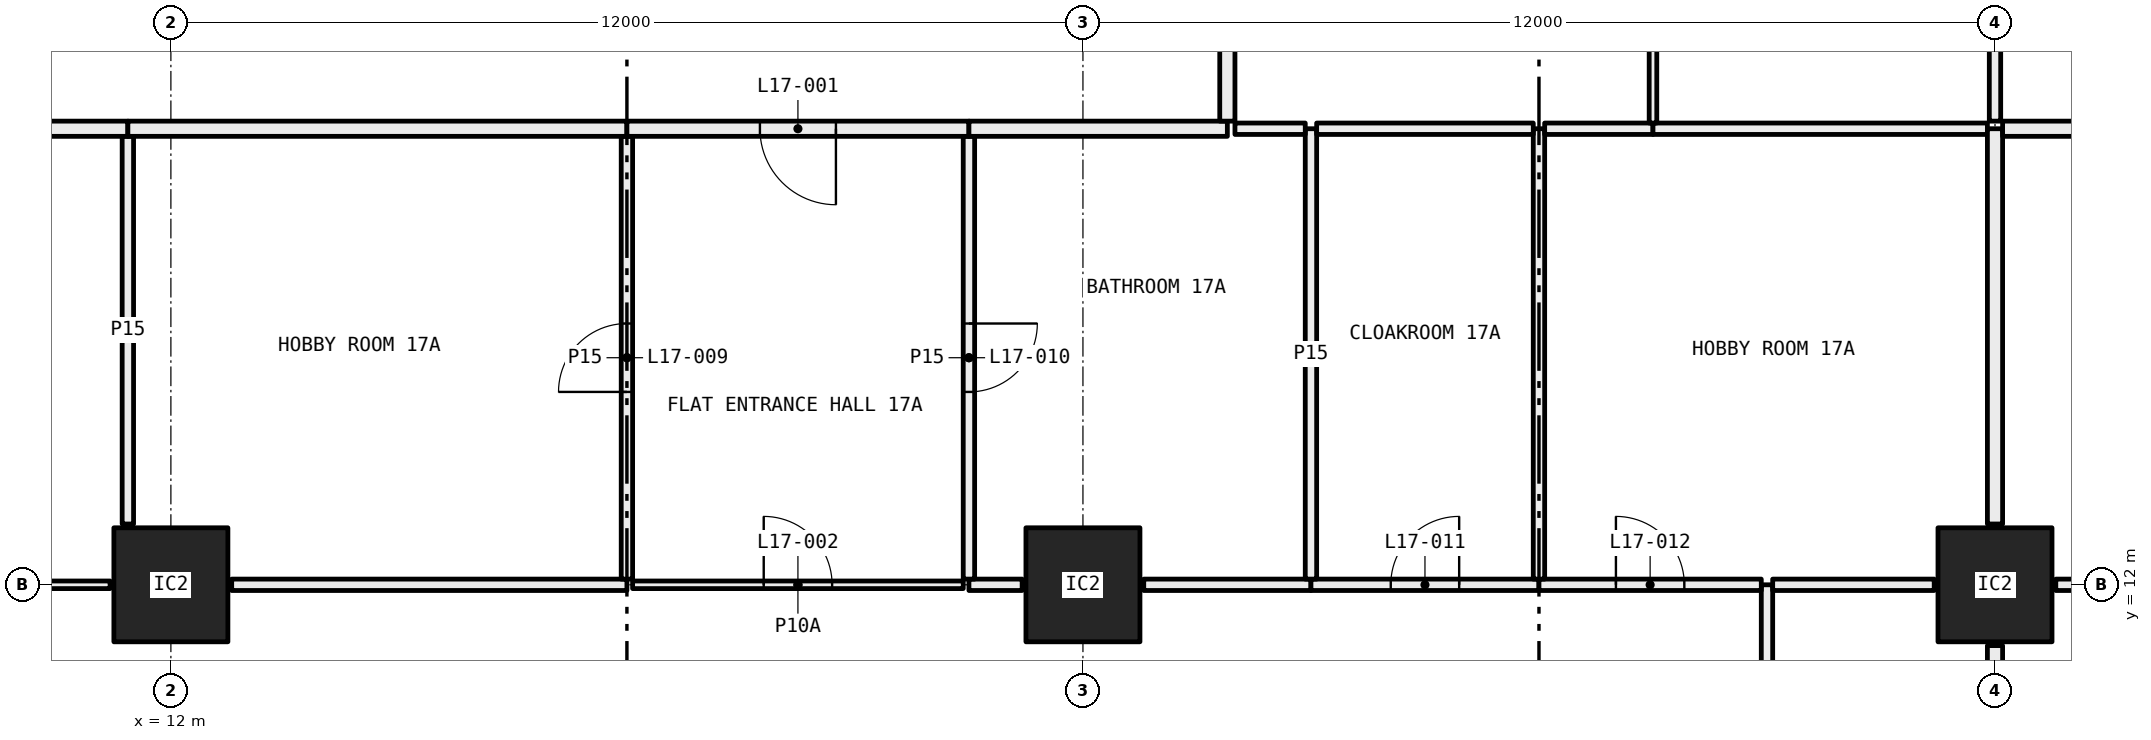
"""IFC4 building model, lengths in metres.
Left out: names, types, materials, properties, quantities, classifications, styles, units other than length and angle.
Written with IfcOpenShell. Run it as: python <this file> out.ifc"""

import sys

from ifc_helpers import new_model, si_unit, direction, frame, frame_2d, origin, origin_2d, place, context, subcontext, project, spatial, rectangle, hollow_rectangle, extrude, element, fill, save


model = new_model("IFC4")
c1 = context("Model", 3, precision=1e-05, world=origin(), true_north=direction((0.0, 1.0)))
c2 = subcontext(c1, "Body", "Model", "MODEL_VIEW")
j1 = project(units=[si_unit("LENGTHUNIT", "METRE"), si_unit("PLANEANGLEUNIT", "RADIAN")], contexts=[c1])
p1 = place(None, origin())
s1 = spatial("IfcSite", under=j1, at=p1, CompositionType="ELEMENT")
p2 = place(p1, origin())
s2 = spatial("IfcBuilding", under=s1, at=p2, CompositionType="ELEMENT")
p3 = place(p2, frame((0.0, 0.0, 71.4)))
s3 = spatial("IfcBuildingStorey", under=s2, at=p3, CompositionType="ELEMENT", Elevation=71.4)
for number, where, z_axis, x_axis in (
    (1, (12.0, 12.0, 0.0), (0.0, 0.0, 1.0), (1.0, 0.0, 0.0)),
    (2, (24.0, 12.0, 0.0), (0.0, 0.0, 1.0), (1.0, 0.0, 0.0)),
    (3, (36.0, 12.0, 0.0), (0.0, 0.0, 1.0), (1.0, 0.0, 0.0)),
):
    element("IfcColumn", number, at=place(p3, frame(where, z_axis=z_axis, x_axis=x_axis)), inside=s3, PredefinedType="COLUMN", context=c2, shape_type="SweptSolid", body=[
        extrude(hollow_rectangle(XDim=1.5, YDim=1.5, WallThickness=0.065, at=origin_2d()), origin(), (0.0, 0.0, 1.0), 3.05),
    ])
p4 = place(p3, frame((33.0, 6.075, 0.0), z_axis=(0.0, 0.0, 1.0), x_axis=(0.0, 1.0, 0.0)))
e4 = element("IfcWall", 4, at=p4, inside=s3, PredefinedType="PARTITIONING", context=c2, shape_type="SweptSolid", body=[
    extrude(rectangle(XDim=5.925, YDim=0.15, at=frame_2d((2.962, 0.0))), origin(), (0.0, 0.0, 1.0), 2.45),
])
p5 = place(p4, frame((2.512, 0.0, 0.0)))
e5 = element("IfcOpeningElement", 5, at=p5, cuts=e4, PredefinedType="OPENING", context=c2, shape_type="SweptSolid", body=[
    extrude(rectangle(XDim=0.9, YDim=2.1, at=frame_2d((0.45, 1.05))), frame((0.0, 0.085, 0.0), z_axis=(0.0, -1.0, 0.0), x_axis=(1.0, 0.0, 0.0)), (0.0, 0.0, 1.0), 0.17),
])
p6 = place(p3, frame((11.2, 12.0, 0.0), z_axis=(0.0, 0.0, 1.0), x_axis=(-1.0, 0.0, 0.0)))
e6 = element("IfcWall", 6, at=p6, inside=s3, PredefinedType="PARTITIONING", context=c2, shape_type="SweptSolid", body=[
    extrude(rectangle(XDim=10.48, YDim=0.1, at=frame_2d((5.24, 0.0))), origin(), (0.0, 0.0, 1.0), 2.45),
])
p7 = place(p6, frame((4.79, 0.0, 0.0)))
e7 = element("IfcOpeningElement", 7, at=p7, cuts=e6, PredefinedType="OPENING", context=c2, shape_type="SweptSolid", body=[
    extrude(rectangle(XDim=0.9, YDim=2.1, at=frame_2d((0.45, 1.05))), frame((0.0, 0.06, 0.0), z_axis=(0.0, -1.0, 0.0), x_axis=(1.0, 0.0, 0.0)), (0.0, 0.0, 1.0), 0.12),
])
p8 = place(p3, frame((18.0, 12.0, 0.0), z_axis=(0.0, 0.0, 1.0), x_axis=(-1.0, 0.0, 0.0)))
e8 = element("IfcWall", 8, at=p8, inside=s3, PredefinedType="PARTITIONING", context=c2, shape_type="SweptSolid", body=[
    extrude(rectangle(XDim=5.2, YDim=0.15, at=frame_2d((2.6, 0.0))), origin(), (0.0, 0.0, 1.0), 2.45),
])
p9 = place(p3, frame((22.425, 12.0, 0.0), z_axis=(0.0, 0.0, 1.0), x_axis=(-1.0, 0.0, 0.0)))
e9 = element("IfcWall", 9, at=p9, inside=s3, PredefinedType="PARTITIONING", context=c2, shape_type="SweptSolid", body=[
    extrude(rectangle(XDim=4.35, YDim=0.1, at=frame_2d((2.175, 0.0))), origin(), (0.0, 0.0, 1.0), 2.45),
])
p10 = place(p9, frame((1.725, 0.0, 0.0)))
e10 = element("IfcOpeningElement", 10, at=p10, cuts=e9, PredefinedType="OPENING", context=c2, shape_type="SweptSolid", body=[
    extrude(rectangle(XDim=0.9, YDim=2.1, at=frame_2d((0.45, 1.05))), frame((0.0, 0.06, 0.0), z_axis=(0.0, -1.0, 0.0), x_axis=(1.0, 0.0, 0.0)), (0.0, 0.0, 1.0), 0.12),
])
p11 = place(p3, frame((23.2, 12.0, 0.0), z_axis=(0.0, 0.0, 1.0), x_axis=(-1.0, 0.0, 0.0)))
e11 = element("IfcWall", 11, at=p11, inside=s3, PredefinedType="PARTITIONING", context=c2, shape_type="SweptSolid", body=[
    extrude(rectangle(XDim=0.7, YDim=0.15, at=frame_2d((0.35, 0.0))), origin(), (0.0, 0.0, 1.0), 2.45),
])
p12 = place(p3, frame((27.0, 12.0, 0.0), z_axis=(0.0, 0.0, 1.0), x_axis=(-1.0, 0.0, 0.0)))
e12 = element("IfcWall", 12, at=p12, inside=s3, PredefinedType="PARTITIONING", context=c2, shape_type="SweptSolid", body=[
    extrude(rectangle(XDim=2.2, YDim=0.15, at=frame_2d((1.1, 0.0))), origin(), (0.0, 0.0, 1.0), 2.45),
])
p13 = place(p3, frame((30.0, 12.0, 0.0), z_axis=(0.0, 0.0, 1.0), x_axis=(-1.0, 0.0, 0.0)))
e13 = element("IfcWall", 13, at=p13, inside=s3, PredefinedType="PARTITIONING", context=c2, shape_type="SweptSolid", body=[
    extrude(rectangle(XDim=3.0, YDim=0.15, at=frame_2d((1.5, 0.0))), origin(), (0.0, 0.0, 1.0), 2.45),
])
p14 = place(p13, frame((1.05, 0.0, 0.0)))
e14 = element("IfcOpeningElement", 14, at=p14, cuts=e13, PredefinedType="OPENING", context=c2, shape_type="SweptSolid", body=[
    extrude(rectangle(XDim=0.9, YDim=2.1, at=frame_2d((0.45, 1.05))), frame((0.0, 0.085, 0.0), z_axis=(0.0, -1.0, 0.0), x_axis=(1.0, 0.0, 0.0)), (0.0, 0.0, 1.0), 0.17),
])
p15 = place(p3, frame((32.925, 12.0, 0.0), z_axis=(0.0, 0.0, 1.0), x_axis=(-1.0, 0.0, 0.0)))
e15 = element("IfcWall", 15, at=p15, inside=s3, PredefinedType="PARTITIONING", context=c2, shape_type="SweptSolid", body=[
    extrude(rectangle(XDim=2.925, YDim=0.15, at=frame_2d((1.462, 0.0))), origin(), (0.0, 0.0, 1.0), 2.45),
])
p16 = place(p15, frame((1.012, 0.0, 0.0)))
e16 = element("IfcOpeningElement", 16, at=p16, cuts=e15, PredefinedType="OPENING", context=c2, shape_type="SweptSolid", body=[
    extrude(rectangle(XDim=0.9, YDim=2.1, at=frame_2d((0.45, 1.05))), frame((0.0, 0.085, 0.0), z_axis=(0.0, -1.0, 0.0), x_axis=(1.0, 0.0, 0.0)), (0.0, 0.0, 1.0), 0.17),
])
p17 = place(p3, frame((35.2, 12.0, 0.0), z_axis=(0.0, 0.0, 1.0), x_axis=(-1.0, 0.0, 0.0)))
e17 = element("IfcWall", 17, at=p17, inside=s3, PredefinedType="PARTITIONING", context=c2, shape_type="SweptSolid", body=[
    extrude(rectangle(XDim=2.125, YDim=0.15, at=frame_2d((1.062, 0.0))), origin(), (0.0, 0.0, 1.0), 2.45),
])
p18 = place(p3, frame((36.0, 6.0, 0.0), z_axis=(0.0, 0.0, 1.0), x_axis=(0.0, 1.0, 0.0)))
e18 = element("IfcWall", 18, at=p18, inside=s3, PredefinedType="PARTITIONING", context=c2, shape_type="SweptSolid", body=[
    extrude(rectangle(XDim=5.2, YDim=0.2, at=frame_2d((2.6, 0.0))), origin(), (0.0, 0.0, 1.0), 2.45),
])
p19 = place(p3, frame((11.434, 12.8, 0.0), z_axis=(0.0, 0.0, 1.0), x_axis=(0.0, 1.0, 0.0)))
e19 = element("IfcWall", 19, at=p19, inside=s3, PredefinedType="PARTITIONING", context=c2, shape_type="SweptSolid", body=[
    extrude(rectangle(XDim=5.1, YDim=0.15, at=frame_2d((2.55, 0.0))), origin(), (0.0, 0.0, 1.0), 3.05),
])
p20 = place(p3, frame((11.434, 18.0, 0.0), z_axis=(0.0, 0.0, 1.0), x_axis=(-1.0, 0.0, 0.0)))
e20 = element("IfcWall", 20, at=p20, inside=s3, PredefinedType="PARTITIONING", context=c2, shape_type="SweptSolid", body=[
    extrude(rectangle(XDim=1.334, YDim=0.2, at=frame_2d((0.667, 0.0))), origin(), (0.0, 0.0, 1.0), 3.05),
])
p21 = place(p3, frame((18.0, 12.075, 0.0), z_axis=(0.0, 0.0, 1.0), x_axis=(0.0, 1.0, 0.0)))
e21 = element("IfcWall", 21, at=p21, inside=s3, PredefinedType="PARTITIONING", context=c2, shape_type="SweptSolid", body=[
    extrude(rectangle(XDim=5.825, YDim=0.15, at=frame_2d((2.913, 0.0))), origin(), (0.0, 0.0, 1.0), 2.45),
])
p22 = place(p21, frame((2.462, 0.0, 0.0)))
e22 = element("IfcOpeningElement", 22, at=p22, cuts=e21, PredefinedType="OPENING", context=c2, shape_type="SweptSolid", body=[
    extrude(rectangle(XDim=0.9, YDim=2.1, at=frame_2d((0.45, 1.05))), frame((0.0, 0.085, 0.0), z_axis=(0.0, -1.0, 0.0), x_axis=(1.0, 0.0, 0.0)), (0.0, 0.0, 1.0), 0.17),
])
p23 = place(p3, frame((18.0, 18.0, 0.0), z_axis=(0.0, 0.0, 1.0), x_axis=(-1.0, 0.0, 0.0)))
e23 = element("IfcWall", 23, at=p23, inside=s3, PredefinedType="PARTITIONING", context=c2, shape_type="SweptSolid", body=[
    extrude(rectangle(XDim=6.566, YDim=0.2, at=frame_2d((3.283, 0.0))), origin(), (0.0, 0.0, 1.0), 3.05),
])
p24 = place(p3, frame((22.5, 12.075, 0.0), z_axis=(0.0, 0.0, 1.0), x_axis=(0.0, 1.0, 0.0)))
e24 = element("IfcWall", 24, at=p24, inside=s3, PredefinedType="PARTITIONING", context=c2, shape_type="SweptSolid", body=[
    extrude(rectangle(XDim=5.825, YDim=0.15, at=frame_2d((2.913, 0.0))), origin(), (0.0, 0.0, 1.0), 2.45),
])
p25 = place(p24, frame((2.462, 0.0, 0.0)))
e25 = element("IfcOpeningElement", 25, at=p25, cuts=e24, PredefinedType="OPENING", context=c2, shape_type="SweptSolid", body=[
    extrude(rectangle(XDim=0.9, YDim=2.1, at=frame_2d((0.45, 1.05))), frame((0.0, 0.085, 0.0), z_axis=(0.0, -1.0, 0.0), x_axis=(1.0, 0.0, 0.0)), (0.0, 0.0, 1.0), 0.17),
])
p26 = place(p3, frame((22.5, 18.0, 0.0), z_axis=(0.0, 0.0, 1.0), x_axis=(-1.0, 0.0, 0.0)))
e26 = element("IfcWall", 26, at=p26, inside=s3, PredefinedType="PARTITIONING", context=c2, shape_type="SweptSolid", body=[
    extrude(rectangle(XDim=4.5, YDim=0.2, at=frame_2d((2.25, 0.0))), origin(), (0.0, 0.0, 1.0), 3.05),
])
p27 = place(p26, frame((1.75, 0.0, 0.0)))
e27 = element("IfcOpeningElement", 27, at=p27, cuts=e26, PredefinedType="OPENING", context=c2, shape_type="SweptSolid", body=[
    extrude(rectangle(XDim=1.0, YDim=2.1, at=frame_2d((0.5, 1.05))), frame((0.0, 0.11, 0.0), z_axis=(0.0, -1.0, 0.0), x_axis=(1.0, 0.0, 0.0)), (0.0, 0.0, 1.0), 0.22),
])
p28 = place(p3, frame((27.0, 12.075, 0.0), z_axis=(0.0, 0.0, 1.0), x_axis=(0.0, 1.0, 0.0)))
e28 = element("IfcWall", 28, at=p28, inside=s3, PredefinedType="PARTITIONING", context=c2, shape_type="SweptSolid", body=[
    extrude(rectangle(XDim=5.925, YDim=0.15, at=frame_2d((2.962, 0.0))), origin(), (0.0, 0.0, 1.0), 2.45),
])
p29 = place(p3, frame((26.925, 18.0, 0.0), z_axis=(0.0, 0.0, 1.0), x_axis=(-1.0, 0.0, 0.0)))
e29 = element("IfcWall", 29, at=p29, inside=s3, PredefinedType="PARTITIONING", context=c2, shape_type="SweptSolid", body=[
    extrude(rectangle(XDim=0.925, YDim=0.15, at=frame_2d((0.462, 0.0))), origin(), (0.0, 0.0, 1.0), 3.05),
])
p30 = place(p3, frame((25.9, 18.0, 0.0), z_axis=(0.0, 0.0, 1.0), x_axis=(-1.0, 0.0, 0.0)))
e30 = element("IfcWall", 30, at=p30, inside=s3, PredefinedType="PARTITIONING", context=c2, shape_type="SweptSolid", body=[
    extrude(rectangle(XDim=3.4, YDim=0.2, at=frame_2d((1.7, 0.0))), origin(), (0.0, 0.0, 1.0), 3.05),
])
p31 = place(p3, frame((30.0, 12.075, 0.0), z_axis=(0.0, 0.0, 1.0), x_axis=(0.0, 1.0, 0.0)))
e31 = element("IfcWall", 31, at=p31, inside=s3, PredefinedType="PARTITIONING", context=c2, shape_type="SweptSolid", body=[
    extrude(rectangle(XDim=5.925, YDim=0.15, at=frame_2d((2.962, 0.0))), origin(), (0.0, 0.0, 1.0), 2.45),
])
p32 = place(p3, frame((29.925, 18.0, 0.0), z_axis=(0.0, 0.0, 1.0), x_axis=(-1.0, 0.0, 0.0)))
e32 = element("IfcWall", 32, at=p32, inside=s3, PredefinedType="PARTITIONING", context=c2, shape_type="SweptSolid", body=[
    extrude(rectangle(XDim=2.85, YDim=0.15, at=frame_2d((1.425, 0.0))), origin(), (0.0, 0.0, 1.0), 3.05),
])
p33 = place(p3, frame((31.5, 18.0, 0.0), z_axis=(0.0, 0.0, 1.0), x_axis=(-1.0, 0.0, 0.0)))
e33 = element("IfcWall", 33, at=p33, inside=s3, PredefinedType="PARTITIONING", context=c2, shape_type="SweptSolid", body=[
    extrude(rectangle(XDim=1.425, YDim=0.15, at=frame_2d((0.712, 0.0))), origin(), (0.0, 0.0, 1.0), 3.05),
])
p34 = place(p3, frame((35.9, 18.0, 0.0), z_axis=(0.0, 0.0, 1.0), x_axis=(-1.0, 0.0, 0.0)))
e34 = element("IfcWall", 34, at=p34, inside=s3, PredefinedType="PARTITIONING", context=c2, shape_type="SweptSolid", body=[
    extrude(rectangle(XDim=4.4, YDim=0.15, at=frame_2d((2.2, 0.0))), origin(), (0.0, 0.0, 1.0), 3.05),
])
p35 = place(p3, frame((36.0, 12.8, 0.0), z_axis=(0.0, 0.0, 1.0), x_axis=(0.0, 1.0, 0.0)))
e35 = element("IfcWall", 35, at=p35, inside=s3, PredefinedType="PARTITIONING", context=c2, shape_type="SweptSolid", body=[
    extrude(rectangle(XDim=5.2, YDim=0.2, at=frame_2d((2.6, 0.0))), origin(), (0.0, 0.0, 1.0), 2.45),
])
p36 = place(p3, frame((31.5, 18.075, 0.0), z_axis=(0.0, 0.0, 1.0), x_axis=(0.0, 1.0, 0.0)))
e36 = element("IfcWall", 36, at=p36, inside=s3, PredefinedType="PARTITIONING", context=c2, shape_type="SweptSolid", body=[
    extrude(rectangle(XDim=6.225, YDim=0.1, at=frame_2d((3.113, 0.0))), origin(), (0.0, 0.0, 1.0), 2.45),
])
p37 = place(p36, frame((2.663, 0.0, 0.0)))
e37 = element("IfcOpeningElement", 37, at=p37, cuts=e36, PredefinedType="OPENING", context=c2, shape_type="SweptSolid", body=[
    extrude(rectangle(XDim=0.9, YDim=2.1, at=frame_2d((0.45, 1.05))), frame((0.0, 0.06, 0.0), z_axis=(0.0, -1.0, 0.0), x_axis=(1.0, 0.0, 0.0)), (0.0, 0.0, 1.0), 0.12),
])
p38 = place(p3, frame((25.9, 23.9, 0.0), z_axis=(0.0, 0.0, 1.0), x_axis=(0.0, -1.0, 0.0)))
e38 = element("IfcWall", 38, at=p38, inside=s3, PredefinedType="PARTITIONING", context=c2, shape_type="SweptSolid", body=[
    extrude(rectangle(XDim=5.8, YDim=0.2, at=frame_2d((2.9, 0.0))), origin(), (0.0, 0.0, 1.0), 3.05),
])
p39 = place(p38, frame((2.4, 0.0, 0.0)))
e39 = element("IfcOpeningElement", 39, at=p39, cuts=e38, PredefinedType="OPENING", context=c2, shape_type="SweptSolid", body=[
    extrude(rectangle(XDim=1.0, YDim=2.1, at=frame_2d((0.5, 1.05))), frame((0.0, 0.11, 0.0), z_axis=(0.0, -1.0, 0.0), x_axis=(1.0, 0.0, 0.0)), (0.0, 0.0, 1.0), 0.22),
])
p40 = place(p3, frame((36.0, 18.1, 0.0), z_axis=(0.0, 0.0, 1.0), x_axis=(0.0, 1.0, 0.0)))
e40 = element("IfcWall", 40, at=p40, inside=s3, PredefinedType="PARTITIONING", context=c2, shape_type="SweptSolid", body=[
    extrude(rectangle(XDim=5.1, YDim=0.15, at=frame_2d((2.55, 0.0))), origin(), (0.0, 0.0, 1.0), 2.45),
])
p41 = place(p40, frame((2.1, 0.0, 0.0)))
e41 = element("IfcOpeningElement", 41, at=p41, cuts=e40, PredefinedType="OPENING", context=c2, shape_type="SweptSolid", body=[
    extrude(rectangle(XDim=0.9, YDim=2.1, at=frame_2d((0.45, 1.05))), frame((0.0, 0.085, 0.0), z_axis=(0.0, -1.0, 0.0), x_axis=(1.0, 0.0, 0.0)), (0.0, 0.0, 1.0), 0.17),
])
p42 = place(p3, frame((36.1, 18.0, 0.0), z_axis=(0.0, 0.0, 1.0), x_axis=(1.0, 0.0, 0.0)))
e42 = element("IfcWall", 42, at=p42, inside=s3, PredefinedType="PARTITIONING", context=c2, shape_type="SweptSolid", body=[
    extrude(rectangle(XDim=2.3, YDim=0.2, at=frame_2d((1.15, 0.0))), origin(), (0.0, 0.0, 1.0), 3.05),
])
p43 = place(p3, frame((38.925, 12.0, 0.0), z_axis=(0.0, 0.0, 1.0), x_axis=(-1.0, 0.0, 0.0)))
e43 = element("IfcWall", 43, at=p43, inside=s3, PredefinedType="PARTITIONING", context=c2, shape_type="SweptSolid", body=[
    extrude(rectangle(XDim=2.125, YDim=0.15, at=frame_2d((1.062, 0.0))), origin(), (0.0, 0.0, 1.0), 2.45),
])
p44 = place(p27, origin())
e44 = element("IfcDoor", 44, at=p44, inside=s3, OperationType="SINGLE_SWING_RIGHT", PredefinedType="DOOR", context=c2, shape_type="SweptSolid", body=[
    extrude(rectangle(XDim=1.0, YDim=2.1, at=frame_2d((0.5, 1.05))), frame((0.0, 0.025, 0.0), z_axis=(0.0, -1.0, 0.0), x_axis=(1.0, 0.0, 0.0)), (0.0, 0.0, 1.0), 0.05),
])
fill(e27, e44)
p45 = place(p10, frame((0.9, 0.0, 0.0), x_axis=(-1.0, 0.0, 0.0)))
e45 = element("IfcDoor", 45, at=p45, inside=s3, OperationType="SINGLE_SWING_RIGHT", PredefinedType="DOOR", context=c2, shape_type="SweptSolid", body=[
    extrude(rectangle(XDim=0.9, YDim=2.1, at=frame_2d((0.45, 1.05))), frame((0.0, 0.025, 0.0), z_axis=(0.0, -1.0, 0.0), x_axis=(1.0, 0.0, 0.0)), (0.0, 0.0, 1.0), 0.05),
])
fill(e10, e45)
p46 = place(p22, origin())
e46 = element("IfcDoor", 46, at=p46, inside=s3, OperationType="SINGLE_SWING_RIGHT", PredefinedType="DOOR", context=c2, shape_type="SweptSolid", body=[
    extrude(rectangle(XDim=0.9, YDim=2.1, at=frame_2d((0.45, 1.05))), frame((0.0, 0.025, 0.0), z_axis=(0.0, -1.0, 0.0), x_axis=(1.0, 0.0, 0.0)), (0.0, 0.0, 1.0), 0.05),
])
fill(e22, e46)
p47 = place(p25, frame((0.9, 0.0, 0.0), x_axis=(-1.0, 0.0, 0.0)))
e47 = element("IfcDoor", 47, at=p47, inside=s3, OperationType="SINGLE_SWING_RIGHT", PredefinedType="DOOR", context=c2, shape_type="SweptSolid", body=[
    extrude(rectangle(XDim=0.9, YDim=2.1, at=frame_2d((0.45, 1.05))), frame((0.0, 0.025, 0.0), z_axis=(0.0, -1.0, 0.0), x_axis=(1.0, 0.0, 0.0)), (0.0, 0.0, 1.0), 0.05),
])
fill(e25, e47)
p48 = place(p14, frame((0.9, 0.0, 0.0), x_axis=(-1.0, 0.0, 0.0)))
e48 = element("IfcDoor", 48, at=p48, inside=s3, OperationType="SINGLE_SWING_LEFT", PredefinedType="DOOR", context=c2, shape_type="SweptSolid", body=[
    extrude(rectangle(XDim=0.9, YDim=2.1, at=frame_2d((0.45, 1.05))), frame((0.0, 0.025, 0.0), z_axis=(0.0, -1.0, 0.0), x_axis=(1.0, 0.0, 0.0)), (0.0, 0.0, 1.0), 0.05),
])
fill(e14, e48)
p49 = place(p16, frame((0.9, 0.0, 0.0), x_axis=(-1.0, 0.0, 0.0)))
e49 = element("IfcDoor", 49, at=p49, inside=s3, OperationType="SINGLE_SWING_RIGHT", PredefinedType="DOOR", context=c2, shape_type="SweptSolid", body=[
    extrude(rectangle(XDim=0.9, YDim=2.1, at=frame_2d((0.45, 1.05))), frame((0.0, 0.025, 0.0), z_axis=(0.0, -1.0, 0.0), x_axis=(1.0, 0.0, 0.0)), (0.0, 0.0, 1.0), 0.05),
])
fill(e16, e49)
save(model, sys.argv[1])
